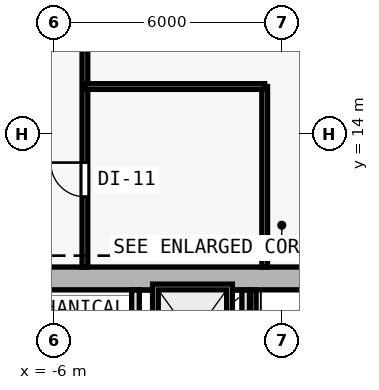
"""IFC4 building model, lengths in metres.
Left out: names, types, materials, properties, quantities, classifications, styles, units other than length and angle.
Written with IfcOpenShell. Run it as: python <this file> out.ifc"""

import sys

from ifc_helpers import new_model, si_unit, direction, frame, frame_2d, origin, place, context, subcontext, project, spatial, rectangle, extrude, element, fill, save


model = new_model("IFC4")
c1 = context("Model", 3, precision=1e-05, world=origin(), true_north=direction((0.0, 1.0)))
c2 = subcontext(c1, "Body", "Model", "MODEL_VIEW")
j1 = project(units=[si_unit("LENGTHUNIT", "METRE"), si_unit("PLANEANGLEUNIT", "RADIAN")], contexts=[c1])
p1 = place(None, origin())
s1 = spatial("IfcSite", under=j1, at=p1, CompositionType="ELEMENT")
p2 = place(p1, origin())
s2 = spatial("IfcBuilding", under=s1, at=p2, CompositionType="ELEMENT")
p3 = place(p2, frame((0.0, 0.0, 13.4)))
s3 = spatial("IfcBuildingStorey", under=s2, at=p3, CompositionType="ELEMENT", Elevation=13.4)
p4 = place(p3, frame((8.0, 10.2, 0.0), z_axis=(0.0, 0.0, 1.0), x_axis=(-1.0, 0.0, 0.0)))
e1 = element("IfcWall", 1, at=p4, inside=s3, PredefinedType="SHEAR", context=c2, shape_type="SweptSolid", body=[
    extrude(rectangle(XDim=16.0, YDim=0.6, at=frame_2d((8.0, 0.0))), origin(), (0.0, 0.0, 1.0), 3.92),
])
p5 = place(p4, frame((4.45, 0.0, 0.0)))
e2 = element("IfcOpeningElement", 2, at=p5, cuts=e1, PredefinedType="OPENING", context=c2, shape_type="SweptSolid", body=[
    extrude(rectangle(XDim=1.1, YDim=2.15, at=frame_2d((0.55, 1.075))), frame((0.0, 0.31, 0.0), z_axis=(0.0, -1.0, 0.0), x_axis=(1.0, 0.0, 0.0)), (0.0, 0.0, 1.0), 0.62),
])
p6 = place(p3, frame((-3.85, 1.35, 0.0), z_axis=(0.0, 0.0, 1.0), x_axis=(0.0, 1.0, 0.0)))
e3 = element("IfcWall", 3, at=p6, inside=s3, PredefinedType="SOLIDWALL", context=c2, shape_type="SweptSolid", body=[
    extrude(rectangle(XDim=8.545, YDim=0.2, at=frame_2d((4.272, 0.0))), origin(), (0.0, 0.0, 1.0), 3.92),
])
p7 = place(p6, frame((1.5, 0.0, 0.0)))
e4 = element("IfcOpeningElement", 4, at=p7, cuts=e3, PredefinedType="OPENING", context=c2, shape_type="SweptSolid", body=[
    extrude(rectangle(XDim=1.0, YDim=2.15, at=frame_2d((0.5, 1.075))), frame((0.0, 0.11, 0.0), z_axis=(0.0, -1.0, 0.0), x_axis=(1.0, 0.0, 0.0)), (0.0, 0.0, 1.0), 0.22),
])
p8 = place(p6, frame((3.18, 0.0, 0.0)))
e5 = element("IfcOpeningElement", 5, at=p8, cuts=e3, PredefinedType="OPENING", context=c2, shape_type="SweptSolid", body=[
    extrude(rectangle(XDim=1.0, YDim=2.15, at=frame_2d((0.5, 1.075))), frame((0.0, 0.11, 0.0), z_axis=(0.0, -1.0, 0.0), x_axis=(1.0, 0.0, 0.0)), (0.0, 0.0, 1.0), 0.22),
])
p9 = place(p3, frame((-0.95, 7.38, 0.0), z_axis=(0.0, 0.0, 1.0), x_axis=(0.0, 1.0, 0.0)))
e6 = element("IfcWall", 6, at=p9, inside=s3, PredefinedType="SOLIDWALL", context=c2, shape_type="SweptSolid", body=[
    extrude(rectangle(XDim=2.515, YDim=0.2, at=frame_2d((1.258, 0.0))), origin(), (0.0, 0.0, 1.0), 3.92),
])
p10 = place(p3, frame((-0.75, 5.92, 0.0), z_axis=(0.0, 0.0, 1.0), x_axis=(0.0, 1.0, 0.0)))
e7 = element("IfcWall", 7, at=p10, inside=s3, PredefinedType="PARTITIONING", context=c2, shape_type="SweptSolid", body=[
    extrude(rectangle(XDim=3.975, YDim=0.15, at=frame_2d((1.988, 0.0))), origin(), (0.0, 0.0, 1.0), 3.92),
])
p11 = place(p3, frame((-5.18, 10.5, 0.0), z_axis=(0.0, 0.0, 1.0), x_axis=(0.0, 1.0, 0.0)))
e8 = element("IfcWall", 8, at=p11, inside=s3, PredefinedType="PARTITIONING", context=c2, shape_type="SweptSolid", body=[
    extrude(rectangle(XDim=7.78, YDim=0.15, at=frame_2d((3.89, 0.0))), origin(), (0.0, 0.0, 1.0), 3.92),
])
p12 = place(p11, frame((1.849, 0.0, 0.0)))
e9 = element("IfcOpeningElement", 9, at=p12, cuts=e8, PredefinedType="OPENING", context=c2, shape_type="SweptSolid", body=[
    extrude(rectangle(XDim=0.9, YDim=2.1, at=frame_2d((0.45, 1.05))), frame((0.0, 0.085, 0.0), z_axis=(0.0, -1.0, 0.0), x_axis=(1.0, 0.0, 0.0)), (0.0, 0.0, 1.0), 0.17),
])
p13 = place(p3, frame((-0.45, 10.5, 0.0), z_axis=(0.0, 0.0, 1.0), x_axis=(0.0, 1.0, 0.0)))
e10 = element("IfcWall", 10, at=p13, inside=s3, PredefinedType="PARTITIONING", context=c2, shape_type="SweptSolid", body=[
    extrude(rectangle(XDim=4.75, YDim=0.15, at=frame_2d((2.375, 0.0))), origin(), (0.0, 0.0, 1.0), 3.92),
])
p14 = place(p3, frame((-5.18, 15.25, 0.0), z_axis=(0.0, 0.0, 1.0), x_axis=(1.0, 0.0, 0.0)))
e11 = element("IfcWall", 11, at=p14, inside=s3, PredefinedType="PARTITIONING", context=c2, shape_type="SweptSolid", body=[
    extrude(rectangle(XDim=4.73, YDim=0.15, at=frame_2d((2.365, 0.0))), origin(), (0.0, 0.0, 1.0), 3.92),
])
p15 = place(p12, origin())
e12 = element("IfcDoor", 12, at=p15, inside=s3, OperationType="SINGLE_SWING_RIGHT", PredefinedType="DOOR", context=c2, shape_type="SweptSolid", body=[
    extrude(rectangle(XDim=0.9, YDim=2.1, at=frame_2d((0.45, 1.05))), frame((0.0, 0.025, 0.0), z_axis=(0.0, -1.0, 0.0), x_axis=(1.0, 0.0, 0.0)), (0.0, 0.0, 1.0), 0.05),
])
fill(e9, e12)
save(model, sys.argv[1])
